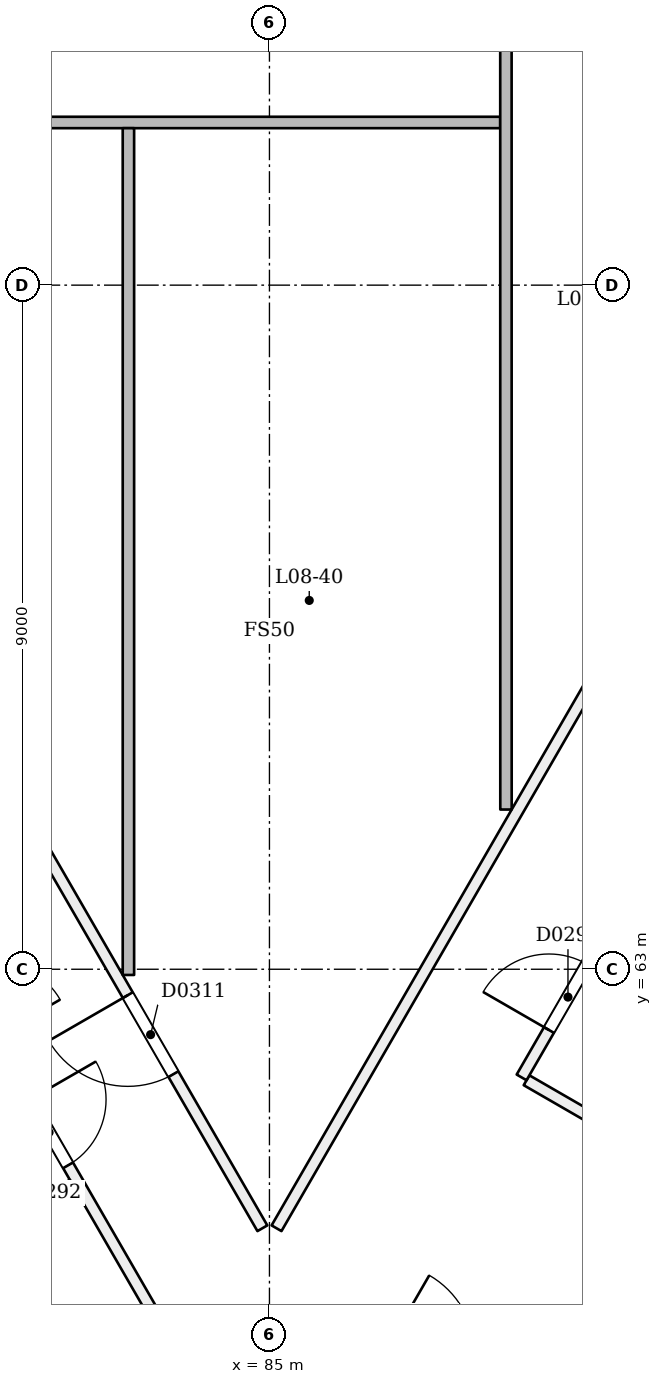
"""IFC4 building model, lengths in metres.
Left out: names, types, materials, properties, quantities, classifications, styles, units other than length and angle.
Written with IfcOpenShell. Run it as: python <this file> out.ifc"""

import sys

from ifc_helpers import new_model, si_unit, direction, frame, frame_2d, origin, place, context, subcontext, project, spatial, rectangle, extrude, element, fill, save


model = new_model("IFC4")
c1 = context("Model", 3, precision=1e-05, world=origin(), true_north=direction((0.0, 1.0)))
c2 = subcontext(c1, "Body", "Model", "MODEL_VIEW")
j1 = project(units=[si_unit("LENGTHUNIT", "METRE"), si_unit("PLANEANGLEUNIT", "RADIAN")], contexts=[c1])
p1 = place(None, origin())
s1 = spatial("IfcSite", under=j1, at=p1, CompositionType="ELEMENT")
p2 = place(p1, origin())
s2 = spatial("IfcBuilding", under=s1, at=p2, CompositionType="ELEMENT")
p3 = place(p2, frame((0.0, 0.0, 37.8)))
s3 = spatial("IfcBuildingStorey", under=s2, at=p3, CompositionType="ELEMENT", Elevation=37.8)
p4 = place(p3, frame((61.497, 96.54, 0.0), z_axis=(0.0, 0.0, 1.0), x_axis=(0.499995935097, -0.866027750645, 0.0)))
e1 = element("IfcWall", 1, at=p4, inside=s3, PredefinedType="PARTITIONING", context=c2, shape_type="SweptSolid", body=[
    extrude(rectangle(XDim=44.742, YDim=0.15, at=frame_2d((22.371, 0.0))), origin(), (0.0, 0.0, 1.0), 2.7),
])
p5 = place(p4, frame((1.84, 0.0, 0.0)))
e2 = element("IfcOpeningElement", 2, at=p5, cuts=e1, PredefinedType="OPENING", context=c2, shape_type="SweptSolid", body=[
    extrude(rectangle(XDim=1.0, YDim=2.1, at=frame_2d((0.5, 1.05))), frame((0.0, 0.085, 0.0), z_axis=(0.0, -1.0, 0.0), x_axis=(1.0, 0.0, 0.0)), (0.0, 0.0, 1.0), 0.171),
])
p6 = place(p4, frame((4.942, 0.0, 0.0)))
e3 = element("IfcOpeningElement", 3, at=p6, cuts=e1, PredefinedType="OPENING", context=c2, shape_type="SweptSolid", body=[
    extrude(rectangle(XDim=1.1, YDim=2.1, at=frame_2d((0.55, 1.05))), frame((0.0, 0.085, 0.0), z_axis=(0.0, -1.0, 0.0), x_axis=(1.0, 0.0, 0.0)), (0.0, 0.0, 1.0), 0.171),
])
p7 = place(p4, frame((11.651, 0.0, 0.0)))
e4 = element("IfcOpeningElement", 4, at=p7, cuts=e1, PredefinedType="OPENING", context=c2, shape_type="SweptSolid", body=[
    extrude(rectangle(XDim=1.0, YDim=2.1, at=frame_2d((0.5, 1.05))), frame((0.0, 0.085, 0.0), z_axis=(0.0, -1.0, 0.0), x_axis=(1.0, 0.0, 0.0)), (0.0, 0.0, 1.0), 0.171),
])
p8 = place(p4, frame((18.371, 0.0, 0.0)))
e5 = element("IfcOpeningElement", 5, at=p8, cuts=e1, PredefinedType="OPENING", context=c2, shape_type="SweptSolid", body=[
    extrude(rectangle(XDim=1.2, YDim=2.1, at=frame_2d((0.6, 1.05))), frame((0.0, 0.085, 0.0), z_axis=(0.0, -1.0, 0.0), x_axis=(1.0, 0.0, 0.0)), (0.0, 0.0, 1.0), 0.171),
])
p9 = place(p4, frame((23.092, 0.0, 0.0)))
e6 = element("IfcOpeningElement", 6, at=p9, cuts=e1, PredefinedType="OPENING", context=c2, shape_type="SweptSolid", body=[
    extrude(rectangle(XDim=1.0, YDim=2.1, at=frame_2d((0.5, 1.05))), frame((0.0, 0.085, 0.0), z_axis=(0.0, -1.0, 0.0), x_axis=(1.0, 0.0, 0.0)), (0.0, 0.0, 1.0), 0.171),
])
p10 = place(p4, frame((29.767, 0.0, 0.0)))
e7 = element("IfcOpeningElement", 7, at=p10, cuts=e1, PredefinedType="OPENING", context=c2, shape_type="SweptSolid", body=[
    extrude(rectangle(XDim=1.0, YDim=2.1, at=frame_2d((0.5, 1.05))), frame((0.0, 0.085, 0.0), z_axis=(0.0, -1.0, 0.0), x_axis=(1.0, 0.0, 0.0)), (0.0, 0.0, 1.0), 0.171),
])
p11 = place(p4, frame((31.976, 0.0, 0.0)))
e8 = element("IfcOpeningElement", 8, at=p11, cuts=e1, PredefinedType="OPENING", context=c2, shape_type="SweptSolid", body=[
    extrude(rectangle(XDim=1.0, YDim=2.1, at=frame_2d((0.5, 1.05))), frame((0.0, 0.085, 0.0), z_axis=(0.0, -1.0, 0.0), x_axis=(1.0, 0.0, 0.0)), (0.0, 0.0, 1.0), 0.171),
])
p12 = place(p4, frame((38.767, 0.0, 0.0)))
e9 = element("IfcOpeningElement", 9, at=p12, cuts=e1, PredefinedType="OPENING", context=c2, shape_type="SweptSolid", body=[
    extrude(rectangle(XDim=1.0, YDim=2.1, at=frame_2d((0.5, 1.05))), frame((0.0, 0.085, 0.0), z_axis=(0.0, -1.0, 0.0), x_axis=(1.0, 0.0, 0.0)), (0.0, 0.0, 1.0), 0.171),
])
p13 = place(p4, frame((40.707, 0.0, 0.0)))
e10 = element("IfcOpeningElement", 10, at=p13, cuts=e1, PredefinedType="OPENING", context=c2, shape_type="SweptSolid", body=[
    extrude(rectangle(XDim=1.0, YDim=2.1, at=frame_2d((0.5, 1.05))), frame((0.0, 0.085, 0.0), z_axis=(0.0, -1.0, 0.0), x_axis=(1.0, 0.0, 0.0)), (0.0, 0.0, 1.0), 0.171),
])
p14 = place(p3, frame((89.772, 60.737, 0.0), z_axis=(0.0, 0.0, 1.0), x_axis=(-0.865949984366, 0.500130607517, 0.0)))
e11 = element("IfcWall", 11, at=p14, inside=s3, PredefinedType="PARTITIONING", context=c2, shape_type="SweptSolid", body=[
    extrude(rectangle(XDim=1.605, YDim=0.15, at=frame_2d((0.802, 0.0))), origin(), (0.0, 0.0, 1.0), 3.1),
])
p15 = place(p3, frame((88.317, 61.577, 0.0), z_axis=(0.0, 0.0, 1.0), x_axis=(0.49999894854, 0.866026010844, 0.0)))
e12 = element("IfcWall", 12, at=p15, inside=s3, PredefinedType="PARTITIONING", context=c2, shape_type="SweptSolid", body=[
    extrude(rectangle(XDim=36.0, YDim=0.15, at=frame_2d((18.0, 0.0))), origin(), (0.0, 0.0, 1.0), 2.7),
])
p16 = place(p15, frame((0.72, 0.0, 0.0)))
e13 = element("IfcOpeningElement", 13, at=p16, cuts=e12, PredefinedType="OPENING", context=c2, shape_type="SweptSolid", body=[
    extrude(rectangle(XDim=1.0, YDim=2.1, at=frame_2d((0.5, 1.05))), frame((0.0, 0.085, 0.0), z_axis=(0.0, -1.0, 0.0), x_axis=(1.0, 0.0, 0.0)), (0.0, 0.0, 1.0), 0.171),
])
p17 = place(p15, frame((7.395, 0.0, 0.0)))
e14 = element("IfcOpeningElement", 14, at=p17, cuts=e12, PredefinedType="OPENING", context=c2, shape_type="SweptSolid", body=[
    extrude(rectangle(XDim=1.0, YDim=2.1, at=frame_2d((0.5, 1.05))), frame((0.0, 0.085, 0.0), z_axis=(0.0, -1.0, 0.0), x_axis=(1.0, 0.0, 0.0)), (0.0, 0.0, 1.0), 0.171),
])
p18 = place(p15, frame((9.605, 0.0, 0.0)))
e15 = element("IfcOpeningElement", 15, at=p18, cuts=e12, PredefinedType="OPENING", context=c2, shape_type="SweptSolid", body=[
    extrude(rectangle(XDim=1.0, YDim=2.1, at=frame_2d((0.5, 1.05))), frame((0.0, 0.085, 0.0), z_axis=(0.0, -1.0, 0.0), x_axis=(1.0, 0.0, 0.0)), (0.0, 0.0, 1.0), 0.171),
])
p19 = place(p15, frame((15.25, 0.0, 0.0)))
e16 = element("IfcOpeningElement", 16, at=p19, cuts=e12, PredefinedType="OPENING", context=c2, shape_type="SweptSolid", body=[
    extrude(rectangle(XDim=1.0, YDim=2.1, at=frame_2d((0.5, 1.05))), frame((0.0, 0.085, 0.0), z_axis=(0.0, -1.0, 0.0), x_axis=(1.0, 0.0, 0.0)), (0.0, 0.0, 1.0), 0.171),
])
p20 = place(p15, frame((18.605, 0.0, 0.0)))
e17 = element("IfcOpeningElement", 17, at=p20, cuts=e12, PredefinedType="OPENING", context=c2, shape_type="SweptSolid", body=[
    extrude(rectangle(XDim=1.0, YDim=2.1, at=frame_2d((0.5, 1.05))), frame((0.0, 0.085, 0.0), z_axis=(0.0, -1.0, 0.0), x_axis=(1.0, 0.0, 0.0)), (0.0, 0.0, 1.0), 0.171),
])
p21 = place(p15, frame((25.395, 0.0, 0.0)))
e18 = element("IfcOpeningElement", 18, at=p21, cuts=e12, PredefinedType="OPENING", context=c2, shape_type="SweptSolid", body=[
    extrude(rectangle(XDim=1.0, YDim=2.1, at=frame_2d((0.5, 1.05))), frame((0.0, 0.085, 0.0), z_axis=(0.0, -1.0, 0.0), x_axis=(1.0, 0.0, 0.0)), (0.0, 0.0, 1.0), 0.171),
])
p22 = place(p15, frame((29.8, 0.0, 0.0)))
e19 = element("IfcOpeningElement", 19, at=p22, cuts=e12, PredefinedType="OPENING", context=c2, shape_type="SweptSolid", body=[
    extrude(rectangle(XDim=1.2, YDim=2.1, at=frame_2d((0.6, 1.05))), frame((0.0, 0.085, 0.0), z_axis=(0.0, -1.0, 0.0), x_axis=(1.0, 0.0, 0.0)), (0.0, 0.0, 1.0), 0.171),
])
p23 = place(p3, frame((102.995, 90.6, 0.0), z_axis=(0.0, 0.0, 1.0), x_axis=(-0.500002425896, -0.866024003188, 0.0)))
e20 = element("IfcWall", 20, at=p23, inside=s3, PredefinedType="PARTITIONING", context=c2, shape_type="SweptSolid", body=[
    extrude(rectangle(XDim=35.804, YDim=0.15, at=frame_2d((17.902, 0.0))), origin(), (0.0, 0.0, 1.0), 3.1),
])
p24 = place(p23, frame((5.095, 0.0, 0.0)))
e21 = element("IfcOpeningElement", 21, at=p24, cuts=e20, PredefinedType="OPENING", context=c2, shape_type="SweptSolid", body=[
    extrude(rectangle(XDim=1.2, YDim=2.1, at=frame_2d((0.6, 1.05))), frame((0.0, 0.085, 0.0), z_axis=(0.0, -1.0, 0.0), x_axis=(1.0, 0.0, 0.0)), (0.0, 0.0, 1.0), 0.171),
])
p25 = place(p23, frame((15.95, 0.0, 0.0)))
e22 = element("IfcOpeningElement", 22, at=p25, cuts=e20, PredefinedType="OPENING", context=c2, shape_type="SweptSolid", body=[
    extrude(rectangle(XDim=1.2, YDim=2.1, at=frame_2d((0.6, 1.05))), frame((0.0, 0.085, 0.0), z_axis=(0.0, -1.0, 0.0), x_axis=(1.0, 0.0, 0.0)), (0.0, 0.0, 1.0), 0.171),
])
p26 = place(p23, frame((22.564, 0.0, 0.0)))
e23 = element("IfcOpeningElement", 23, at=p26, cuts=e20, PredefinedType="OPENING", context=c2, shape_type="SweptSolid", body=[
    extrude(rectangle(XDim=1.0, YDim=2.1, at=frame_2d((0.5, 1.05))), frame((0.0, 0.085, 0.0), z_axis=(0.0, -1.0, 0.0), x_axis=(1.0, 0.0, 0.0)), (0.0, 0.0, 1.0), 0.171),
])
p27 = place(p3, frame((84.907, 59.593, 0.0), z_axis=(0.0, 0.0, 1.0), x_axis=(-0.500002425896, 0.866024003188, 0.0)))
e24 = element("IfcWall", 24, at=p27, inside=s3, PredefinedType="PARTITIONING", context=c2, shape_type="SweptSolid", body=[
    extrude(rectangle(XDim=35.804, YDim=0.15, at=frame_2d((17.902, 0.0))), origin(), (0.0, 0.0, 1.0), 3.1),
])
p28 = place(p27, frame((2.341, 0.0, 0.0)))
e25 = element("IfcOpeningElement", 25, at=p28, cuts=e24, PredefinedType="OPENING", context=c2, shape_type="SweptSolid", body=[
    extrude(rectangle(XDim=1.2, YDim=2.1, at=frame_2d((0.6, 1.05))), frame((0.0, 0.085, 0.0), z_axis=(0.0, -1.0, 0.0), x_axis=(1.0, 0.0, 0.0)), (0.0, 0.0, 1.0), 0.171),
])
p29 = place(p27, frame((20.792, 0.0, 0.0)))
e26 = element("IfcOpeningElement", 26, at=p29, cuts=e24, PredefinedType="OPENING", context=c2, shape_type="SweptSolid", body=[
    extrude(rectangle(XDim=1.2, YDim=2.1, at=frame_2d((0.6, 1.05))), frame((0.0, 0.085, 0.0), z_axis=(0.0, -1.0, 0.0), x_axis=(1.0, 0.0, 0.0)), (0.0, 0.0, 1.0), 0.171),
])
p30 = place(p27, frame((10.768, 0.0, 0.0)))
e27 = element("IfcOpeningElement", 27, at=p30, cuts=e24, PredefinedType="OPENING", context=c2, shape_type="SweptSolid", body=[
    extrude(rectangle(XDim=1.0, YDim=2.1, at=frame_2d((0.5, 1.05))), frame((0.0, 0.085, 0.0), z_axis=(0.0, -1.0, 0.0), x_axis=(1.0, 0.0, 0.0)), (0.0, 0.0, 1.0), 0.171),
])
p31 = place(p27, frame((29.859, 0.0, 0.0)))
e28 = element("IfcOpeningElement", 28, at=p31, cuts=e24, PredefinedType="OPENING", context=c2, shape_type="SweptSolid", body=[
    extrude(rectangle(XDim=1.0, YDim=2.1, at=frame_2d((0.5, 1.05))), frame((0.0, 0.085, 0.0), z_axis=(0.0, -1.0, 0.0), x_axis=(1.0, 0.0, 0.0)), (0.0, 0.0, 1.0), 0.171),
])
p32 = place(p3, frame((79.952, 58.774, 0.0), z_axis=(0.0, 0.0, 1.0), x_axis=(0.866011447264, 0.500024172624, 0.0)))
e29 = element("IfcWall", 29, at=p32, inside=s3, PredefinedType="PARTITIONING", context=c2, shape_type="SweptSolid", body=[
    extrude(rectangle(XDim=2.825, YDim=0.1, at=frame_2d((1.413, 0.0))), origin(), (0.0, 0.0, 1.0), 3.1),
])
p33 = place(p32, frame((1.0, 0.0, 0.0)))
e30 = element("IfcOpeningElement", 30, at=p33, cuts=e29, PredefinedType="OPENING", context=c2, shape_type="SweptSolid", body=[
    extrude(rectangle(XDim=0.9, YDim=2.1, at=frame_2d((0.45, 1.05))), frame((0.0, 0.061, 0.0), z_axis=(0.0, -1.0, 0.0), x_axis=(1.0, 0.0, 0.0)), (0.0, 0.0, 1.0), 0.121),
])
p34 = place(p3, frame((76.638, 74.14, 0.0), z_axis=(0.0, 0.0, 1.0), x_axis=(1.0, 0.0, 0.0)))
e31 = element("IfcWall", 31, at=p34, inside=s3, PredefinedType="PARTITIONING", context=c2, shape_type="SweptSolid", body=[
    extrude(rectangle(XDim=11.398, YDim=0.15, at=frame_2d((5.699, 0.0))), origin(), (0.0, 0.0, 1.0), 3.1),
])
p35 = place(p3, frame((83.145, 74.065, 0.0), z_axis=(0.0, 0.0, 1.0), x_axis=(0.0, -1.0, 0.0)))
e32 = element("IfcWall", 32, at=p35, inside=s3, PredefinedType="PARTITIONING", context=c2, shape_type="SweptSolid", body=[
    extrude(rectangle(XDim=11.14, YDim=0.15, at=frame_2d((5.57, 0.0))), origin(), (0.0, 0.0, 1.0), 3.1),
])
p36 = place(p3, frame((88.112, 65.101, 0.0), z_axis=(0.0, 0.0, 1.0), x_axis=(-8.0138907e-05, 0.999999996789, 0.0)))
e33 = element("IfcWall", 33, at=p36, inside=s3, PredefinedType="PARTITIONING", context=c2, shape_type="SweptSolid", body=[
    extrude(rectangle(XDim=18.279, YDim=0.15, at=frame_2d((9.139, 0.0))), origin(), (0.0, 0.0, 1.0), 3.1),
])
p37 = place(p3, frame((88.223, 76.366, 0.0), z_axis=(0.0, 0.0, 1.0), x_axis=(0.866010639187, -0.500025572161, 0.0)))
e34 = element("IfcWall", 34, at=p37, inside=s3, PredefinedType="PARTITIONING", context=c2, shape_type="SweptSolid", body=[
    extrude(rectangle(XDim=5.601, YDim=0.15, at=frame_2d((2.8, 0.0))), origin(), (0.0, 0.0, 1.0), 3.1),
])
p38 = place(p13, origin())
e35 = element("IfcDoor", 35, at=p38, inside=s3, OperationType="SINGLE_SWING_LEFT", PredefinedType="NOTDEFINED", context=c2, shape_type="SweptSolid", body=[
    extrude(rectangle(XDim=1.0, YDim=2.1, at=frame_2d((0.5, 1.05))), frame((0.0, 0.025, 0.0), z_axis=(0.0, -1.0, 0.0), x_axis=(1.0, 0.0, 0.0)), (0.0, 0.0, 1.0), 0.05),
])
fill(e10, e35)
p39 = place(p16, origin())
e36 = element("IfcDoor", 36, at=p39, inside=s3, OperationType="SINGLE_SWING_LEFT", PredefinedType="NOTDEFINED", context=c2, shape_type="SweptSolid", body=[
    extrude(rectangle(XDim=1.0, YDim=2.1, at=frame_2d((0.5, 1.05))), frame((0.0, 0.025, 0.0), z_axis=(0.0, -1.0, 0.0), x_axis=(1.0, 0.0, 0.0)), (0.0, 0.0, 1.0), 0.05),
])
fill(e13, e36)
p40 = place(p28, origin())
e37 = element("IfcDoor", 37, at=p40, inside=s3, OperationType="SINGLE_SWING_RIGHT", PredefinedType="NOTDEFINED", context=c2, shape_type="SweptSolid", body=[
    extrude(rectangle(XDim=1.2, YDim=2.1, at=frame_2d((0.6, 1.05))), frame((0.0, 0.025, 0.0), z_axis=(0.0, -1.0, 0.0), x_axis=(1.0, 0.0, 0.0)), (0.0, 0.0, 1.0), 0.05),
])
fill(e25, e37)
save(model, sys.argv[1])
